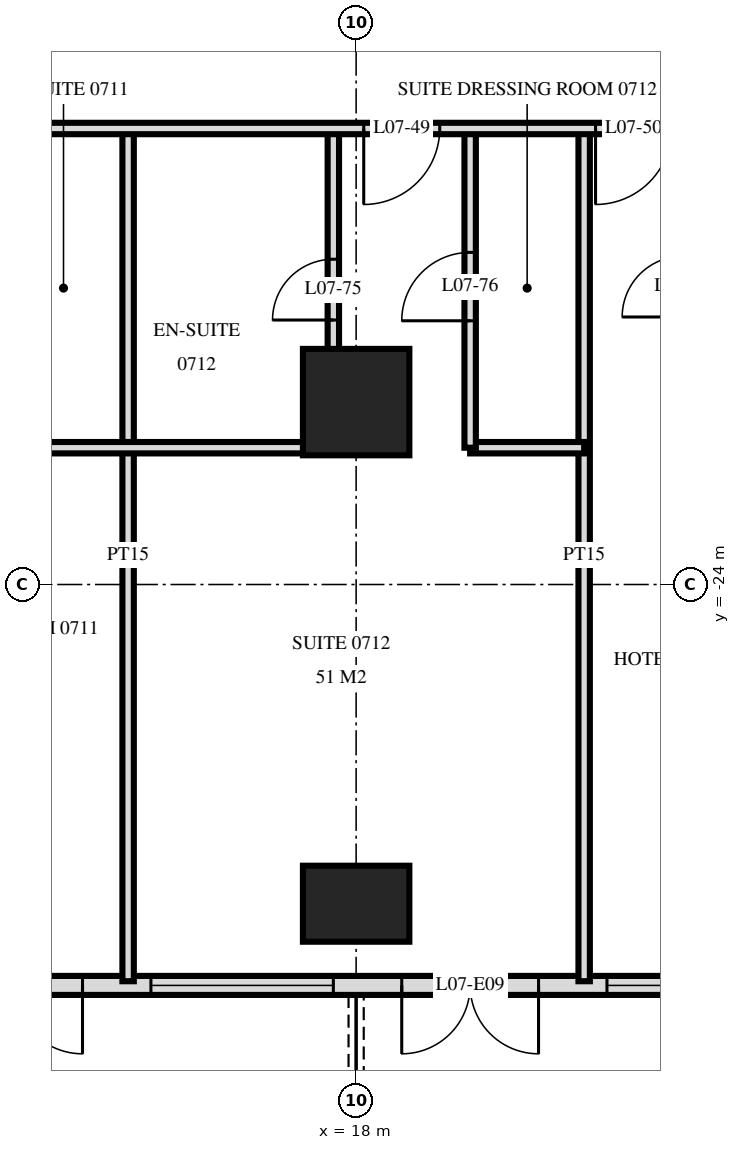
"""IFC4 building model, lengths in metres.
Left out: names, types, materials, properties, quantities, classifications, styles, units other than length and angle.
Written with IfcOpenShell. Run it as: python <this file> out.ifc"""

import sys

from ifc_helpers import new_model, si_unit, direction, frame, frame_2d, origin, origin_2d, place, context, subcontext, project, spatial, rectangle, extrude, element, fill, save


model = new_model("IFC4")
c1 = context("Model", 3, precision=1e-05, world=origin(), true_north=direction((0.0, 1.0)))
c2 = subcontext(c1, "Body", "Model", "MODEL_VIEW")
j1 = project(units=[si_unit("LENGTHUNIT", "METRE"), si_unit("PLANEANGLEUNIT", "RADIAN")], contexts=[c1])
p1 = place(None, origin())
s1 = spatial("IfcSite", under=j1, at=p1, CompositionType="ELEMENT")
p2 = place(p1, origin())
s2 = spatial("IfcBuilding", under=s1, at=p2, CompositionType="ELEMENT")
p3 = place(p2, frame((0.0, 0.0, 34.8)))
s3 = spatial("IfcBuildingStorey", under=s2, at=p3, CompositionType="ELEMENT", Elevation=34.8)
p4 = place(p3, frame((18.0, -28.2, 0.0), z_axis=(0.0, 0.0, 1.0), x_axis=(1.0, 0.0, 0.0)))
e1 = element("IfcColumn", 1, at=p4, inside=s3, PredefinedType="COLUMN", context=c2, shape_type="SweptSolid", body=[
    extrude(rectangle(XDim=1.4, YDim=1.0, at=origin_2d()), origin(), (0.0, 0.0, 1.0), 3.6),
])
p5 = place(p3, frame((18.0, -21.6, 0.0), z_axis=(0.0, 0.0, 1.0), x_axis=(1.0, 0.0, 0.0)))
e2 = element("IfcColumn", 2, at=p5, inside=s3, PredefinedType="COLUMN", context=c2, shape_type="SweptSolid", body=[
    extrude(rectangle(XDim=1.4, YDim=1.4, at=origin_2d()), origin(), (0.0, 0.0, 1.0), 3.6),
])
p6 = place(p3, frame((-28.775, -29.275, 0.0), z_axis=(0.0, 0.0, 1.0), x_axis=(1.0, 0.0, 0.0)))
e3 = element("IfcWall", 3, at=p6, inside=s3, PredefinedType="SOLIDWALL", context=c2, shape_type="SweptSolid", body=[
    extrude(rectangle(XDim=57.551, YDim=0.25, at=frame_2d((28.775, 0.0))), origin(), (0.0, 0.0, 1.0), 3.32),
])
p7 = place(p6, frame((0.575, 0.0, 0.0)))
e4 = element("IfcOpeningElement", 4, at=p7, cuts=e3, PredefinedType="OPENING", context=c2, shape_type="SweptSolid", body=[
    extrude(rectangle(XDim=1.8, YDim=2.4, at=frame_2d((0.9, 1.2))), frame((0.0, 0.135, 0.0), z_axis=(0.0, -1.0, 0.0), x_axis=(1.0, 0.0, 0.0)), (0.0, 0.0, 1.0), 0.27),
])
p8 = place(p6, frame((5.375, 0.0, 0.0)))
e5 = element("IfcOpeningElement", 5, at=p8, cuts=e3, PredefinedType="OPENING", context=c2, shape_type="SweptSolid", body=[
    extrude(rectangle(XDim=1.8, YDim=2.4, at=frame_2d((0.9, 1.2))), frame((0.0, 0.135, 0.0), z_axis=(0.0, -1.0, 0.0), x_axis=(1.0, 0.0, 0.0)), (0.0, 0.0, 1.0), 0.27),
])
p9 = place(p6, frame((8.075, 0.0, 0.3)))
e6 = element("IfcOpeningElement", 6, at=p9, cuts=e3, PredefinedType="OPENING", context=c2, shape_type="SweptSolid", body=[
    extrude(rectangle(XDim=2.4, YDim=2.1, at=frame_2d((1.2, 1.05))), frame((0.0, 0.135, 0.0), z_axis=(0.0, -1.0, 0.0), x_axis=(1.0, 0.0, 0.0)), (0.0, 0.0, 1.0), 0.27),
])
p10 = place(p6, frame((11.375, 0.0, 0.0)))
e7 = element("IfcOpeningElement", 7, at=p10, cuts=e3, PredefinedType="OPENING", context=c2, shape_type="SweptSolid", body=[
    extrude(rectangle(XDim=1.8, YDim=2.4, at=frame_2d((0.9, 1.2))), frame((0.0, 0.135, 0.0), z_axis=(0.0, -1.0, 0.0), x_axis=(1.0, 0.0, 0.0)), (0.0, 0.0, 1.0), 0.27),
])
p11 = place(p6, frame((14.075, 0.0, 0.3)))
e8 = element("IfcOpeningElement", 8, at=p11, cuts=e3, PredefinedType="OPENING", context=c2, shape_type="SweptSolid", body=[
    extrude(rectangle(XDim=2.4, YDim=2.1, at=frame_2d((1.2, 1.05))), frame((0.0, 0.135, 0.0), z_axis=(0.0, -1.0, 0.0), x_axis=(1.0, 0.0, 0.0)), (0.0, 0.0, 1.0), 0.27),
])
p12 = place(p6, frame((17.375, 0.0, 0.0)))
e9 = element("IfcOpeningElement", 9, at=p12, cuts=e3, PredefinedType="OPENING", context=c2, shape_type="SweptSolid", body=[
    extrude(rectangle(XDim=1.8, YDim=2.4, at=frame_2d((0.9, 1.2))), frame((0.0, 0.135, 0.0), z_axis=(0.0, -1.0, 0.0), x_axis=(1.0, 0.0, 0.0)), (0.0, 0.0, 1.0), 0.27),
])
p13 = place(p6, frame((20.075, 0.0, 0.3)))
e10 = element("IfcOpeningElement", 10, at=p13, cuts=e3, PredefinedType="OPENING", context=c2, shape_type="SweptSolid", body=[
    extrude(rectangle(XDim=2.4, YDim=2.1, at=frame_2d((1.2, 1.05))), frame((0.0, 0.135, 0.0), z_axis=(0.0, -1.0, 0.0), x_axis=(1.0, 0.0, 0.0)), (0.0, 0.0, 1.0), 0.27),
])
p14 = place(p6, frame((23.075, 0.0, 0.3)))
e11 = element("IfcOpeningElement", 11, at=p14, cuts=e3, PredefinedType="OPENING", context=c2, shape_type="SweptSolid", body=[
    extrude(rectangle(XDim=2.4, YDim=2.1, at=frame_2d((1.2, 1.05))), frame((0.0, 0.135, 0.0), z_axis=(0.0, -1.0, 0.0), x_axis=(1.0, 0.0, 0.0)), (0.0, 0.0, 1.0), 0.27),
])
p15 = place(p6, frame((26.375, 0.0, 0.0)))
e12 = element("IfcOpeningElement", 12, at=p15, cuts=e3, PredefinedType="OPENING", context=c2, shape_type="SweptSolid", body=[
    extrude(rectangle(XDim=1.8, YDim=2.4, at=frame_2d((0.9, 1.2))), frame((0.0, 0.135, 0.0), z_axis=(0.0, -1.0, 0.0), x_axis=(1.0, 0.0, 0.0)), (0.0, 0.0, 1.0), 0.27),
])
p16 = place(p6, frame((29.375, 0.0, 0.0)))
e13 = element("IfcOpeningElement", 13, at=p16, cuts=e3, PredefinedType="OPENING", context=c2, shape_type="SweptSolid", body=[
    extrude(rectangle(XDim=1.8, YDim=2.4, at=frame_2d((0.9, 1.2))), frame((0.0, 0.135, 0.0), z_axis=(0.0, -1.0, 0.0), x_axis=(1.0, 0.0, 0.0)), (0.0, 0.0, 1.0), 0.27),
])
p17 = place(p6, frame((32.075, 0.0, 0.3)))
e14 = element("IfcOpeningElement", 14, at=p17, cuts=e3, PredefinedType="OPENING", context=c2, shape_type="SweptSolid", body=[
    extrude(rectangle(XDim=2.4, YDim=2.1, at=frame_2d((1.2, 1.05))), frame((0.0, 0.135, 0.0), z_axis=(0.0, -1.0, 0.0), x_axis=(1.0, 0.0, 0.0)), (0.0, 0.0, 1.0), 0.27),
])
p18 = place(p6, frame((35.375, 0.0, 0.0)))
e15 = element("IfcOpeningElement", 15, at=p18, cuts=e3, PredefinedType="OPENING", context=c2, shape_type="SweptSolid", body=[
    extrude(rectangle(XDim=1.8, YDim=2.4, at=frame_2d((0.9, 1.2))), frame((0.0, 0.135, 0.0), z_axis=(0.0, -1.0, 0.0), x_axis=(1.0, 0.0, 0.0)), (0.0, 0.0, 1.0), 0.27),
])
p19 = place(p6, frame((38.075, 0.0, 0.3)))
e16 = element("IfcOpeningElement", 16, at=p19, cuts=e3, PredefinedType="OPENING", context=c2, shape_type="SweptSolid", body=[
    extrude(rectangle(XDim=2.4, YDim=2.1, at=frame_2d((1.2, 1.05))), frame((0.0, 0.135, 0.0), z_axis=(0.0, -1.0, 0.0), x_axis=(1.0, 0.0, 0.0)), (0.0, 0.0, 1.0), 0.27),
])
p20 = place(p6, frame((41.375, 0.0, 0.0)))
e17 = element("IfcOpeningElement", 17, at=p20, cuts=e3, PredefinedType="OPENING", context=c2, shape_type="SweptSolid", body=[
    extrude(rectangle(XDim=1.8, YDim=2.4, at=frame_2d((0.9, 1.2))), frame((0.0, 0.135, 0.0), z_axis=(0.0, -1.0, 0.0), x_axis=(1.0, 0.0, 0.0)), (0.0, 0.0, 1.0), 0.27),
])
p21 = place(p6, frame((44.075, 0.0, 0.3)))
e18 = element("IfcOpeningElement", 18, at=p21, cuts=e3, PredefinedType="OPENING", context=c2, shape_type="SweptSolid", body=[
    extrude(rectangle(XDim=2.4, YDim=2.1, at=frame_2d((1.2, 1.05))), frame((0.0, 0.135, 0.0), z_axis=(0.0, -1.0, 0.0), x_axis=(1.0, 0.0, 0.0)), (0.0, 0.0, 1.0), 0.27),
])
p22 = place(p6, frame((47.375, 0.0, 0.0)))
e19 = element("IfcOpeningElement", 19, at=p22, cuts=e3, PredefinedType="OPENING", context=c2, shape_type="SweptSolid", body=[
    extrude(rectangle(XDim=1.8, YDim=2.4, at=frame_2d((0.9, 1.2))), frame((0.0, 0.135, 0.0), z_axis=(0.0, -1.0, 0.0), x_axis=(1.0, 0.0, 0.0)), (0.0, 0.0, 1.0), 0.27),
])
p23 = place(p6, frame((50.075, 0.0, 0.3)))
e20 = element("IfcOpeningElement", 20, at=p23, cuts=e3, PredefinedType="OPENING", context=c2, shape_type="SweptSolid", body=[
    extrude(rectangle(XDim=2.4, YDim=2.1, at=frame_2d((1.2, 1.05))), frame((0.0, 0.135, 0.0), z_axis=(0.0, -1.0, 0.0), x_axis=(1.0, 0.0, 0.0)), (0.0, 0.0, 1.0), 0.27),
])
p24 = place(p6, frame((53.375, 0.0, 0.0)))
e21 = element("IfcOpeningElement", 21, at=p24, cuts=e3, PredefinedType="OPENING", context=c2, shape_type="SweptSolid", body=[
    extrude(rectangle(XDim=1.8, YDim=2.4, at=frame_2d((0.9, 1.2))), frame((0.0, 0.135, 0.0), z_axis=(0.0, -1.0, 0.0), x_axis=(1.0, 0.0, 0.0)), (0.0, 0.0, 1.0), 0.27),
])
p25 = place(p3, frame((21.0, -29.22, 0.0), z_axis=(0.0, 0.0, 1.0), x_axis=(0.0, 1.0, 0.0)))
e22 = element("IfcWall", 22, at=p25, inside=s3, PredefinedType="PARTITIONING", context=c2, shape_type="SweptSolid", body=[
    extrude(rectangle(XDim=11.22, YDim=0.15, at=frame_2d((5.61, 0.0))), origin(), (0.0, 0.0, 1.0), 3.32),
])
p26 = place(p3, frame((19.5, -22.2, 0.0), z_axis=(0.0, 0.0, 1.0), x_axis=(0.0, 1.0, 0.0)))
e23 = element("IfcWall", 23, at=p26, inside=s3, PredefinedType="PARTITIONING", context=c2, shape_type="SweptSolid", body=[
    extrude(rectangle(XDim=4.2, YDim=0.15, at=frame_2d((2.1, 0.0))), origin(), (0.0, 0.0, 1.0), 3.32),
])
p27 = place(p26, frame((1.67, 0.0, 0.0)))
e24 = element("IfcOpeningElement", 24, at=p27, cuts=e23, PredefinedType="OPENING", context=c2, shape_type="SweptSolid", body=[
    extrude(rectangle(XDim=0.9, YDim=2.1, at=frame_2d((0.45, 1.05))), frame((0.0, 0.085, 0.0), z_axis=(0.0, -1.0, 0.0), x_axis=(1.0, 0.0, 0.0)), (0.0, 0.0, 1.0), 0.17),
])
p28 = place(p3, frame((17.7, -22.2, 0.0), z_axis=(0.0, 0.0, 1.0), x_axis=(0.0, 1.0, 0.0)))
e25 = element("IfcWall", 25, at=p28, inside=s3, PredefinedType="PARTITIONING", context=c2, shape_type="SweptSolid", body=[
    extrude(rectangle(XDim=4.2, YDim=0.15, at=frame_2d((2.1, 0.0))), origin(), (0.0, 0.0, 1.0), 3.32),
])
p29 = place(p28, frame((1.68, 0.0, 0.0)))
e26 = element("IfcOpeningElement", 26, at=p29, cuts=e25, PredefinedType="OPENING", context=c2, shape_type="SweptSolid", body=[
    extrude(rectangle(XDim=0.8, YDim=2.1, at=frame_2d((0.4, 1.05))), frame((0.0, 0.085, 0.0), z_axis=(0.0, -1.0, 0.0), x_axis=(1.0, 0.0, 0.0)), (0.0, 0.0, 1.0), 0.17),
])
p30 = place(p3, frame((15.0, -29.22, 0.0), z_axis=(0.0, 0.0, 1.0), x_axis=(0.0, 1.0, 0.0)))
e27 = element("IfcWall", 27, at=p30, inside=s3, PredefinedType="PARTITIONING", context=c2, shape_type="SweptSolid", body=[
    extrude(rectangle(XDim=11.22, YDim=0.15, at=frame_2d((5.61, 0.0))), origin(), (0.0, 0.0, 1.0), 3.32),
])
p31 = place(p3, frame((13.3, -22.2, 0.0), z_axis=(0.0, 0.0, 1.0), x_axis=(1.0, 0.0, 0.0)))
e28 = element("IfcWall", 28, at=p31, inside=s3, PredefinedType="PARTITIONING", context=c2, shape_type="SweptSolid", body=[
    extrude(rectangle(XDim=4.4, YDim=0.15, at=frame_2d((2.2, 0.0))), origin(), (0.0, 0.0, 1.0), 3.32),
])
p32 = place(p3, frame((19.5, -22.2, 0.0), z_axis=(0.0, 0.0, 1.0), x_axis=(1.0, 0.0, 0.0)))
e29 = element("IfcWall", 29, at=p32, inside=s3, PredefinedType="PARTITIONING", context=c2, shape_type="SweptSolid", body=[
    extrude(rectangle(XDim=1.5, YDim=0.15, at=frame_2d((0.75, 0.0))), origin(), (0.0, 0.0, 1.0), 3.32),
])
p33 = place(p3, frame((-33.12, -18.0, 0.0), z_axis=(0.0, 0.0, 1.0), x_axis=(1.0, 0.0, 0.0)))
e30 = element("IfcWall", 30, at=p33, inside=s3, PredefinedType="PARTITIONING", context=c2, shape_type="SweptSolid", body=[
    extrude(rectangle(XDim=66.24, YDim=0.15, at=frame_2d((33.12, 0.0))), origin(), (0.0, 0.0, 1.0), 3.32),
])
p34 = place(p33, frame((12.27, 0.0, 0.0)))
e31 = element("IfcOpeningElement", 31, at=p34, cuts=e30, PredefinedType="OPENING", context=c2, shape_type="SweptSolid", body=[
    extrude(rectangle(XDim=1.0, YDim=2.1, at=frame_2d((0.5, 1.05))), frame((0.0, 0.085, 0.0), z_axis=(0.0, -1.0, 0.0), x_axis=(1.0, 0.0, 0.0)), (0.0, 0.0, 1.0), 0.17),
])
p35 = place(p33, frame((16.97, 0.0, 0.0)))
e32 = element("IfcOpeningElement", 32, at=p35, cuts=e30, PredefinedType="OPENING", context=c2, shape_type="SweptSolid", body=[
    extrude(rectangle(XDim=1.0, YDim=2.1, at=frame_2d((0.5, 1.05))), frame((0.0, 0.085, 0.0), z_axis=(0.0, -1.0, 0.0), x_axis=(1.0, 0.0, 0.0)), (0.0, 0.0, 1.0), 0.17),
])
p36 = place(p33, frame((18.27, 0.0, 0.0)))
e33 = element("IfcOpeningElement", 33, at=p36, cuts=e30, PredefinedType="OPENING", context=c2, shape_type="SweptSolid", body=[
    extrude(rectangle(XDim=1.0, YDim=2.1, at=frame_2d((0.5, 1.05))), frame((0.0, 0.085, 0.0), z_axis=(0.0, -1.0, 0.0), x_axis=(1.0, 0.0, 0.0)), (0.0, 0.0, 1.0), 0.17),
])
p37 = place(p33, frame((22.97, 0.0, 0.0)))
e34 = element("IfcOpeningElement", 34, at=p37, cuts=e30, PredefinedType="OPENING", context=c2, shape_type="SweptSolid", body=[
    extrude(rectangle(XDim=1.0, YDim=2.1, at=frame_2d((0.5, 1.05))), frame((0.0, 0.085, 0.0), z_axis=(0.0, -1.0, 0.0), x_axis=(1.0, 0.0, 0.0)), (0.0, 0.0, 1.0), 0.17),
])
p38 = place(p33, frame((24.27, 0.0, 0.0)))
e35 = element("IfcOpeningElement", 35, at=p38, cuts=e30, PredefinedType="OPENING", context=c2, shape_type="SweptSolid", body=[
    extrude(rectangle(XDim=1.0, YDim=2.1, at=frame_2d((0.5, 1.05))), frame((0.0, 0.085, 0.0), z_axis=(0.0, -1.0, 0.0), x_axis=(1.0, 0.0, 0.0)), (0.0, 0.0, 1.0), 0.17),
])
p39 = place(p33, frame((28.97, 0.0, 0.0)))
e36 = element("IfcOpeningElement", 36, at=p39, cuts=e30, PredefinedType="OPENING", context=c2, shape_type="SweptSolid", body=[
    extrude(rectangle(XDim=1.0, YDim=2.1, at=frame_2d((0.5, 1.05))), frame((0.0, 0.085, 0.0), z_axis=(0.0, -1.0, 0.0), x_axis=(1.0, 0.0, 0.0)), (0.0, 0.0, 1.0), 0.17),
])
p40 = place(p33, frame((30.27, 0.0, 0.0)))
e37 = element("IfcOpeningElement", 37, at=p40, cuts=e30, PredefinedType="OPENING", context=c2, shape_type="SweptSolid", body=[
    extrude(rectangle(XDim=1.0, YDim=2.1, at=frame_2d((0.5, 1.05))), frame((0.0, 0.085, 0.0), z_axis=(0.0, -1.0, 0.0), x_axis=(1.0, 0.0, 0.0)), (0.0, 0.0, 1.0), 0.17),
])
p41 = place(p33, frame((34.97, 0.0, 0.0)))
e38 = element("IfcOpeningElement", 38, at=p41, cuts=e30, PredefinedType="OPENING", context=c2, shape_type="SweptSolid", body=[
    extrude(rectangle(XDim=1.0, YDim=2.1, at=frame_2d((0.5, 1.05))), frame((0.0, 0.085, 0.0), z_axis=(0.0, -1.0, 0.0), x_axis=(1.0, 0.0, 0.0)), (0.0, 0.0, 1.0), 0.17),
])
p42 = place(p33, frame((37.27, 0.0, 0.0)))
e39 = element("IfcOpeningElement", 39, at=p42, cuts=e30, PredefinedType="OPENING", context=c2, shape_type="SweptSolid", body=[
    extrude(rectangle(XDim=1.0, YDim=2.1, at=frame_2d((0.5, 1.05))), frame((0.0, 0.085, 0.0), z_axis=(0.0, -1.0, 0.0), x_axis=(1.0, 0.0, 0.0)), (0.0, 0.0, 1.0), 0.17),
])
p43 = place(p33, frame((43.97, 0.0, 0.0)))
e40 = element("IfcOpeningElement", 40, at=p43, cuts=e30, PredefinedType="OPENING", context=c2, shape_type="SweptSolid", body=[
    extrude(rectangle(XDim=1.0, YDim=2.1, at=frame_2d((0.5, 1.05))), frame((0.0, 0.085, 0.0), z_axis=(0.0, -1.0, 0.0), x_axis=(1.0, 0.0, 0.0)), (0.0, 0.0, 1.0), 0.17),
])
p44 = place(p33, frame((45.27, 0.0, 0.0)))
e41 = element("IfcOpeningElement", 41, at=p44, cuts=e30, PredefinedType="OPENING", context=c2, shape_type="SweptSolid", body=[
    extrude(rectangle(XDim=1.0, YDim=2.1, at=frame_2d((0.5, 1.05))), frame((0.0, 0.085, 0.0), z_axis=(0.0, -1.0, 0.0), x_axis=(1.0, 0.0, 0.0)), (0.0, 0.0, 1.0), 0.17),
])
p45 = place(p33, frame((51.22, 0.0, 0.0)))
e42 = element("IfcOpeningElement", 42, at=p45, cuts=e30, PredefinedType="OPENING", context=c2, shape_type="SweptSolid", body=[
    extrude(rectangle(XDim=1.0, YDim=2.1, at=frame_2d((0.5, 1.05))), frame((0.0, 0.085, 0.0), z_axis=(0.0, -1.0, 0.0), x_axis=(1.0, 0.0, 0.0)), (0.0, 0.0, 1.0), 0.17),
])
p46 = place(p33, frame((54.27, 0.0, 0.0)))
e43 = element("IfcOpeningElement", 43, at=p46, cuts=e30, PredefinedType="OPENING", context=c2, shape_type="SweptSolid", body=[
    extrude(rectangle(XDim=1.0, YDim=2.1, at=frame_2d((0.5, 1.05))), frame((0.0, 0.085, 0.0), z_axis=(0.0, -1.0, 0.0), x_axis=(1.0, 0.0, 0.0)), (0.0, 0.0, 1.0), 0.17),
])
p47 = place(p33, frame((6.07, 0.0, 0.0)))
e44 = element("IfcOpeningElement", 44, at=p47, cuts=e30, PredefinedType="OPENING", context=c2, shape_type="SweptSolid", body=[
    extrude(rectangle(XDim=1.0, YDim=2.1, at=frame_2d((0.5, 1.05))), frame((0.0, 0.085, 0.0), z_axis=(0.0, -1.0, 0.0), x_axis=(1.0, 0.0, 0.0)), (0.0, 0.0, 1.0), 0.17),
])
p48 = place(p33, frame((63.37, 0.0, 0.0)))
e45 = element("IfcOpeningElement", 45, at=p48, cuts=e30, PredefinedType="OPENING", context=c2, shape_type="SweptSolid", body=[
    extrude(rectangle(XDim=1.0, YDim=2.1, at=frame_2d((0.5, 1.05))), frame((0.0, 0.085, 0.0), z_axis=(0.0, -1.0, 0.0), x_axis=(1.0, 0.0, 0.0)), (0.0, 0.0, 1.0), 0.17),
])
p49 = place(p20, frame((0.9, 0.0, 0.0), z_axis=(0.0, 0.0, 1.0), x_axis=(-1.0, 0.0, 0.0)))
e46 = element("IfcDoor", 46, at=p49, inside=s3, OperationType="DOUBLE_DOOR_SINGLE_SWING", PredefinedType="DOOR", context=c2, shape_type="SweptSolid", body=[
    extrude(rectangle(XDim=1.8, YDim=2.4, at=frame_2d((0.0, 1.2))), frame((0.0, -0.025, 0.0), z_axis=(0.0, 1.0, 0.0), x_axis=(-1.0, 0.0, 0.0)), (0.0, 0.0, 1.0), 0.05),
])
fill(e17, e46)
p50 = place(p21, origin())
e47 = element("IfcWindow", 47, at=p50, inside=s3, PartitioningType="SINGLE_PANEL", PredefinedType="WINDOW", context=c2, shape_type="SweptSolid", body=[
    extrude(rectangle(XDim=2.4, YDim=2.1, at=frame_2d((1.2, 1.05))), frame((0.0, 0.03, 0.0), z_axis=(0.0, -1.0, 0.0), x_axis=(1.0, 0.0, 0.0)), (0.0, 0.0, 1.0), 0.06),
])
fill(e18, e47)
p51 = place(p22, frame((0.9, 0.0, 0.0), z_axis=(0.0, 0.0, 1.0), x_axis=(-1.0, 0.0, 0.0)))
e48 = element("IfcDoor", 48, at=p51, inside=s3, OperationType="DOUBLE_DOOR_SINGLE_SWING", PredefinedType="DOOR", context=c2, shape_type="SweptSolid", body=[
    extrude(rectangle(XDim=1.8, YDim=2.4, at=frame_2d((0.0, 1.2))), frame((0.0, -0.025, 0.0), z_axis=(0.0, 1.0, 0.0), x_axis=(-1.0, 0.0, 0.0)), (0.0, 0.0, 1.0), 0.05),
])
fill(e19, e48)
p52 = place(p23, origin())
e49 = element("IfcWindow", 49, at=p52, inside=s3, PartitioningType="SINGLE_PANEL", PredefinedType="WINDOW", context=c2, shape_type="SweptSolid", body=[
    extrude(rectangle(XDim=2.4, YDim=2.1, at=frame_2d((1.2, 1.05))), frame((0.0, 0.03, 0.0), z_axis=(0.0, -1.0, 0.0), x_axis=(1.0, 0.0, 0.0)), (0.0, 0.0, 1.0), 0.06),
])
fill(e20, e49)
p53 = place(p45, frame((0.5, 0.0, 0.0), z_axis=(0.0, 0.0, 1.0), x_axis=(-1.0, 0.0, 0.0)))
e50 = element("IfcDoor", 50, at=p53, inside=s3, OperationType="SINGLE_SWING_LEFT", PredefinedType="DOOR", context=c2, shape_type="SweptSolid", body=[
    extrude(rectangle(XDim=1.0, YDim=2.1, at=frame_2d((0.0, 1.05))), frame((0.0, -0.025, 0.0), z_axis=(0.0, 1.0, 0.0), x_axis=(-1.0, 0.0, 0.0)), (0.0, 0.0, 1.0), 0.05),
])
fill(e42, e50)
p54 = place(p46, frame((0.5, 0.0, 0.0), z_axis=(0.0, 0.0, 1.0), x_axis=(-1.0, 0.0, 0.0)))
e51 = element("IfcDoor", 51, at=p54, inside=s3, OperationType="SINGLE_SWING_LEFT", PredefinedType="DOOR", context=c2, shape_type="SweptSolid", body=[
    extrude(rectangle(XDim=1.0, YDim=2.1, at=frame_2d((0.0, 1.05))), frame((0.0, -0.025, 0.0), z_axis=(0.0, 1.0, 0.0), x_axis=(-1.0, 0.0, 0.0)), (0.0, 0.0, 1.0), 0.05),
])
fill(e43, e51)
p55 = place(p29, origin())
e52 = element("IfcDoor", 52, at=p55, inside=s3, OperationType="SINGLE_SWING_RIGHT", PredefinedType="DOOR", context=c2, shape_type="SweptSolid", body=[
    extrude(rectangle(XDim=0.8, YDim=2.1, at=frame_2d((0.4, 1.05))), frame((0.0, 0.025, 0.0), z_axis=(0.0, -1.0, 0.0), x_axis=(1.0, 0.0, 0.0)), (0.0, 0.0, 1.0), 0.05),
])
fill(e26, e52)
p56 = place(p27, origin())
e53 = element("IfcDoor", 53, at=p56, inside=s3, OperationType="SINGLE_SWING_RIGHT", PredefinedType="DOOR", context=c2, shape_type="SweptSolid", body=[
    extrude(rectangle(XDim=0.9, YDim=2.1, at=frame_2d((0.45, 1.05))), frame((0.0, 0.025, 0.0), z_axis=(0.0, -1.0, 0.0), x_axis=(1.0, 0.0, 0.0)), (0.0, 0.0, 1.0), 0.05),
])
fill(e24, e53)
save(model, sys.argv[1])
